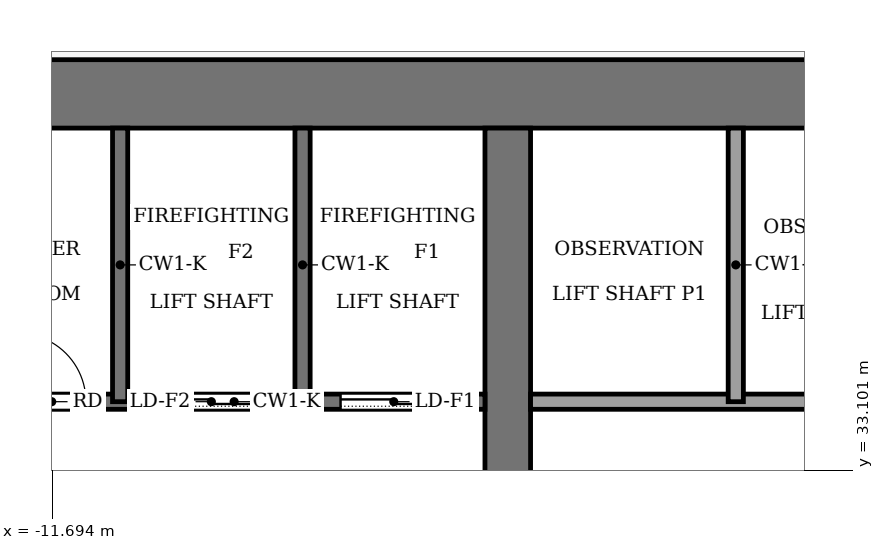
"""IFC4 building model, lengths in metres.
Left out: names, types, materials, properties, quantities, classifications, styles, units other than length and angle.
Written with IfcOpenShell. Run it as: python <this file> out.ifc"""

import sys

from ifc_helpers import new_model, si_unit, direction, frame, frame_2d, origin, place, context, subcontext, project, spatial, rectangle, extrude, element, fill, save


model = new_model("IFC4")
c1 = context("Model", 3, precision=1e-05, world=origin(), true_north=direction((0.0, 1.0)))
c2 = subcontext(c1, "Body", "Model", "MODEL_VIEW")
j1 = project(units=[si_unit("LENGTHUNIT", "METRE"), si_unit("PLANEANGLEUNIT", "RADIAN")], contexts=[c1])
p1 = place(None, origin())
s1 = spatial("IfcSite", under=j1, at=p1, CompositionType="ELEMENT")
p2 = place(p1, origin())
s2 = spatial("IfcBuilding", under=s1, at=p2, CompositionType="ELEMENT")
p3 = place(p2, frame((0.0, 0.0, 226.0)))
s3 = spatial("IfcBuildingStorey", under=s2, at=p3, CompositionType="ELEMENT", Elevation=226.0)
p4 = place(p3, frame((-13.5, 38.05, -0.25), z_axis=(0.0, 0.0, 1.0), x_axis=(1.0, 0.0, 0.0)))
e1 = element("IfcWall", 1, at=p4, inside=s3, PredefinedType="SHEAR", context=c2, shape_type="SweptSolid", body=[
    extrude(rectangle(XDim=27.0, YDim=0.9, at=frame_2d((13.5, 0.0))), origin(), (0.0, 0.0, 1.0), 7.12),
])
p5 = place(p3, frame((-5.7, 18.4, -0.25), z_axis=(0.0, 0.0, 1.0), x_axis=(0.0, 1.0, 0.0)))
e2 = element("IfcWall", 2, at=p5, inside=s3, PredefinedType="SHEAR", context=c2, shape_type="SweptSolid", body=[
    extrude(rectangle(XDim=19.2, YDim=0.6, at=frame_2d((9.6, 0.0))), origin(), (0.0, 0.0, 1.0), 7.12),
])
p6 = place(p5, frame((8.35, 0.0, 0.25)))
e3 = element("IfcOpeningElement", 3, at=p6, cuts=e2, PredefinedType="OPENING", context=c2, shape_type="SweptSolid", body=[
    extrude(rectangle(XDim=0.9, YDim=2.1, at=frame_2d((0.45, 1.05))), frame((0.0, 0.31, 0.0), z_axis=(0.0, -1.0, 0.0), x_axis=(1.0, 0.0, 0.0)), (0.0, 0.0, 1.0), 0.62),
])
p7 = place(p3, frame((-12.6, 34.0, 0.0), z_axis=(0.0, 0.0, 1.0), x_axis=(1.0, 0.0, 0.0)))
e4 = element("IfcWall", 4, at=p7, inside=s3, PredefinedType="PARTITIONING", context=c2, shape_type="SweptSolid", body=[
    extrude(rectangle(XDim=6.6, YDim=0.2, at=frame_2d((3.3, 0.0))), origin(), (0.0, 0.0, 1.0), 6.87),
])
p8 = place(p7, frame((4.7, 0.0, 0.0)))
e5 = element("IfcOpeningElement", 5, at=p8, cuts=e4, PredefinedType="OPENING", context=c2, shape_type="SweptSolid", body=[
    extrude(rectangle(XDim=1.4, YDim=2.2, at=frame_2d((0.7, 1.1))), frame((0.0, 0.11, 0.0), z_axis=(0.0, -1.0, 0.0), x_axis=(1.0, 0.0, 0.0)), (0.0, 0.0, 1.0), 0.22),
])
p9 = place(p7, frame((2.3, 0.0, 0.0)))
e6 = element("IfcOpeningElement", 6, at=p9, cuts=e4, PredefinedType="OPENING", context=c2, shape_type="SweptSolid", body=[
    extrude(rectangle(XDim=1.4, YDim=2.2, at=frame_2d((0.7, 1.1))), frame((0.0, 0.11, 0.0), z_axis=(0.0, -1.0, 0.0), x_axis=(1.0, 0.0, 0.0)), (0.0, 0.0, 1.0), 0.22),
])
p10 = place(p7, frame((0.45, 0.0, 0.0)))
e7 = element("IfcOpeningElement", 7, at=p10, cuts=e4, PredefinedType="OPENING", context=c2, shape_type="SweptSolid", body=[
    extrude(rectangle(XDim=0.9, YDim=2.1, at=frame_2d((0.45, 1.05))), frame((0.0, 0.11, 0.0), z_axis=(0.0, -1.0, 0.0), x_axis=(1.0, 0.0, 0.0)), (0.0, 0.0, 1.0), 0.22),
])
p11 = place(p3, frame((-5.4, 34.0, 0.0), z_axis=(0.0, 0.0, 1.0), x_axis=(1.0, 0.0, 0.0)))
e8 = element("IfcWall", 8, at=p11, inside=s3, PredefinedType="PARTITIONING", context=c2, shape_type="SweptSolid", body=[
    extrude(rectangle(XDim=10.8, YDim=0.2, at=frame_2d((5.4, 0.0))), origin(), (0.0, 0.0, 1.0), 6.87),
])
p12 = place(p11, frame((6.15, 0.0, 0.0)))
e9 = element("IfcOpeningElement", 9, at=p12, cuts=e8, PredefinedType="OPENING", context=c2, shape_type="SweptSolid", body=[
    extrude(rectangle(XDim=1.2, YDim=2.2, at=frame_2d((0.6, 1.1))), frame((0.0, 0.11, 0.0), z_axis=(0.0, -1.0, 0.0), x_axis=(1.0, 0.0, 0.0)), (0.0, 0.0, 1.0), 0.22),
])
p13 = place(p11, frame((8.95, 0.0, 0.0)))
e10 = element("IfcOpeningElement", 10, at=p13, cuts=e8, PredefinedType="OPENING", context=c2, shape_type="SweptSolid", body=[
    extrude(rectangle(XDim=1.0, YDim=2.1, at=frame_2d((0.5, 1.05))), frame((0.0, 0.11, 0.0), z_axis=(0.0, -1.0, 0.0), x_axis=(1.0, 0.0, 0.0)), (0.0, 0.0, 1.0), 0.22),
])
for number, where, z_axis, x_axis in (
    (11, (-10.8, 34.0, 0.0), (0.0, 0.0, 1.0), (0.0, 1.0, 0.0)),
    (12, (-8.4, 34.0, 0.0), (0.0, 0.0, 1.0), (0.0, 1.0, 0.0)),
    (13, (-2.7, 34.0, 0.0), (0.0, 0.0, 1.0), (0.0, 1.0, 0.0)),
):
    element("IfcWall", number, at=place(p3, frame(where, z_axis=z_axis, x_axis=x_axis)), inside=s3, PredefinedType="PARTITIONING", context=c2, shape_type="SweptSolid", body=[
        extrude(rectangle(XDim=3.6, YDim=0.2, at=frame_2d((1.8, 0.0))), origin(), (0.0, 0.0, 1.0), 6.87),
    ])
p14 = place(p8, origin())
e14 = element("IfcDoor", 14, at=p14, inside=s3, OperationType="SLIDING_TO_LEFT", PredefinedType="DOOR", context=c2, shape_type="SweptSolid", body=[
    extrude(rectangle(XDim=1.4, YDim=2.2, at=frame_2d((0.7, 1.1))), frame((0.0, 0.025, 0.0), z_axis=(0.0, -1.0, 0.0), x_axis=(1.0, 0.0, 0.0)), (0.0, 0.0, 1.0), 0.05),
])
fill(e5, e14)
p15 = place(p9, origin())
e15 = element("IfcDoor", 15, at=p15, inside=s3, OperationType="SLIDING_TO_LEFT", PredefinedType="DOOR", context=c2, shape_type="SweptSolid", body=[
    extrude(rectangle(XDim=1.4, YDim=2.2, at=frame_2d((0.7, 1.1))), frame((0.0, 0.025, 0.0), z_axis=(0.0, -1.0, 0.0), x_axis=(1.0, 0.0, 0.0)), (0.0, 0.0, 1.0), 0.05),
])
fill(e6, e15)
p16 = place(p10, origin())
e16 = element("IfcDoor", 16, at=p16, inside=s3, OperationType="SINGLE_SWING_RIGHT", PredefinedType="DOOR", context=c2, shape_type="SweptSolid", body=[
    extrude(rectangle(XDim=0.9, YDim=2.1, at=frame_2d((0.45, 1.05))), frame((0.0, 0.025, 0.0), z_axis=(0.0, -1.0, 0.0), x_axis=(1.0, 0.0, 0.0)), (0.0, 0.0, 1.0), 0.05),
])
fill(e7, e16)
save(model, sys.argv[1])
